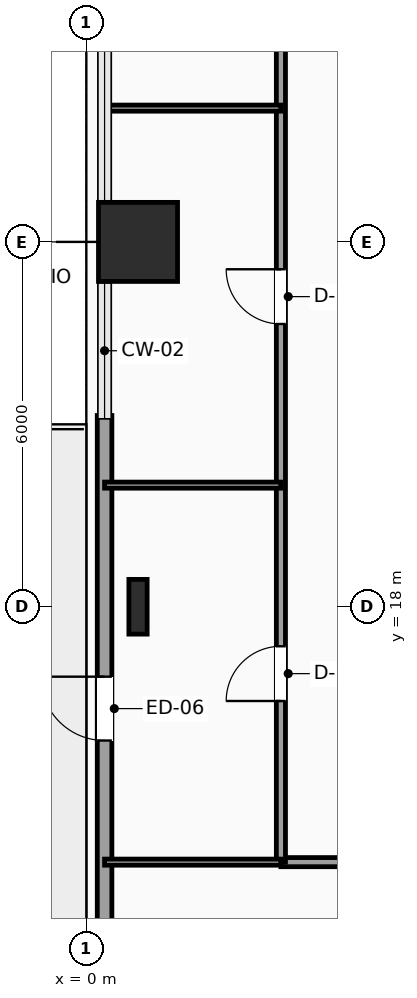
"""IFC4 building model, lengths in metres.
Left out: names, types, materials, properties, quantities, classifications, styles, units other than length and angle.
Written with IfcOpenShell. Run it as: python <this file> out.ifc"""

import sys

from ifc_helpers import new_model, si_unit, direction, frame, frame_2d, origin, origin_2d, place, context, subcontext, project, spatial, rectangle, i_section, extrude, element, fill, save


model = new_model("IFC4")
c1 = context("Model", 3, precision=1e-05, world=origin(), true_north=direction((0.0, 1.0)))
c2 = subcontext(c1, "Body", "Model", "MODEL_VIEW")
j1 = project(units=[si_unit("LENGTHUNIT", "METRE"), si_unit("PLANEANGLEUNIT", "RADIAN")], contexts=[c1])
p1 = place(None, origin())
s1 = spatial("IfcSite", under=j1, at=p1, CompositionType="ELEMENT")
p2 = place(p1, origin())
s2 = spatial("IfcBuilding", under=s1, at=p2, CompositionType="ELEMENT")
p3 = place(p2, frame((0.0, 0.0, 36.3)))
s3 = spatial("IfcBuildingStorey", under=s2, at=p3, CompositionType="ELEMENT", Elevation=36.3)
p4 = place(p3, frame((0.85, 18.0, 0.0), z_axis=(0.0, 0.0, 1.0), x_axis=(1.0, 0.0, 0.0)))
e1 = element("IfcColumn", 1, at=p4, inside=s3, PredefinedType="COLUMN", context=c2, shape_type="SweptSolid", body=[
    extrude(i_section(OverallWidth=0.3, OverallDepth=0.9, WebThickness=0.019, FlangeThickness=0.035, FilletRadius=0.03, at=origin_2d()), origin(), (0.0, 0.0, 1.0), 3.9),
])
p5 = place(p3, frame((0.85, 24.0, 0.0), z_axis=(0.0, 0.0, 1.0), x_axis=(1.0, 0.0, 0.0)))
e2 = element("IfcColumn", 2, at=p5, inside=s3, PredefinedType="COLUMN", context=c2, shape_type="SweptSolid", body=[
    extrude(rectangle(XDim=1.3, YDim=1.3, at=origin_2d()), origin(), (0.0, 0.0, 1.0), 3.9),
])
p6 = place(p3, frame((0.3, 11.855, 0.0), z_axis=(0.0, 0.0, 1.0), x_axis=(0.0, 1.0, 0.0)))
e3 = element("IfcWall", 3, at=p6, inside=s3, PredefinedType="SOLIDWALL", context=c2, shape_type="SweptSolid", body=[
    extrude(rectangle(XDim=9.29, YDim=0.24, at=frame_2d((4.645, 0.0))), origin(), (0.0, 0.0, 1.0), 3.65),
])
p7 = place(p6, frame((3.945, 0.0, 0.0)))
e4 = element("IfcOpeningElement", 4, at=p7, cuts=e3, PredefinedType="OPENING", context=c2, shape_type="SweptSolid", body=[
    extrude(rectangle(XDim=1.05, YDim=2.2, at=frame_2d((0.525, 1.1))), frame((0.0, 0.13, 0.0), z_axis=(0.0, -1.0, 0.0), x_axis=(1.0, 0.0, 0.0)), (0.0, 0.0, 1.0), 0.26),
])
p8 = place(p3, frame((5.15, 13.8, 0.0), z_axis=(0.0, 0.0, 1.0), x_axis=(-1.0, 0.0, 0.0)))
e5 = element("IfcWall", 5, at=p8, inside=s3, PredefinedType="PARTITIONING", context=c2, shape_type="SweptSolid", body=[
    extrude(rectangle(XDim=1.95, YDim=0.15, at=frame_2d((0.975, 0.0))), origin(), (0.0, 0.0, 1.0), 3.65),
])
p9 = place(p3, frame((3.2, 13.8, 0.0), z_axis=(0.0, 0.0, 1.0), x_axis=(0.0, 1.0, 0.0)))
e6 = element("IfcWall", 6, at=p9, inside=s3, PredefinedType="PARTITIONING", context=c2, shape_type="SweptSolid", body=[
    extrude(rectangle(XDim=16.45, YDim=0.15, at=frame_2d((8.225, 0.0))), origin(), (0.0, 0.0, 1.0), 3.65),
])
p10 = place(p9, frame((2.65, 0.0, 0.0)))
e7 = element("IfcOpeningElement", 7, at=p10, cuts=e6, PredefinedType="OPENING", context=c2, shape_type="SweptSolid", body=[
    extrude(rectangle(XDim=0.9, YDim=2.1, at=frame_2d((0.45, 1.05))), frame((0.0, 0.085, 0.0), z_axis=(0.0, -1.0, 0.0), x_axis=(1.0, 0.0, 0.0)), (0.0, 0.0, 1.0), 0.17),
])
p11 = place(p9, frame((8.85, 0.0, 0.0)))
e8 = element("IfcOpeningElement", 8, at=p11, cuts=e6, PredefinedType="OPENING", context=c2, shape_type="SweptSolid", body=[
    extrude(rectangle(XDim=0.9, YDim=2.1, at=frame_2d((0.45, 1.05))), frame((0.0, 0.085, 0.0), z_axis=(0.0, -1.0, 0.0), x_axis=(1.0, 0.0, 0.0)), (0.0, 0.0, 1.0), 0.17),
])
p12 = place(p9, frame((13.975, 0.0, 0.0)))
e9 = element("IfcOpeningElement", 9, at=p12, cuts=e6, PredefinedType="OPENING", context=c2, shape_type="SweptSolid", body=[
    extrude(rectangle(XDim=0.9, YDim=2.1, at=frame_2d((0.45, 1.05))), frame((0.0, 0.085, 0.0), z_axis=(0.0, -1.0, 0.0), x_axis=(1.0, 0.0, 0.0)), (0.0, 0.0, 1.0), 0.17),
])
for number, where, z_axis, x_axis in (
    (10, (0.3, 13.8, 0.0), (0.0, 0.0, 1.0), (1.0, 0.0, 0.0)),
    (11, (0.3, 20.0, 0.0), (0.0, 0.0, 1.0), (1.0, 0.0, 0.0)),
    (12, (0.3, 26.2, 0.0), (0.0, 0.0, 1.0), (1.0, 0.0, 0.0)),
):
    element("IfcWall", number, at=place(p3, frame(where, z_axis=z_axis, x_axis=x_axis)), inside=s3, PredefinedType="PARTITIONING", context=c2, shape_type="SweptSolid", body=[
        extrude(rectangle(XDim=2.9, YDim=0.1, at=frame_2d((1.45, 0.0))), origin(), (0.0, 0.0, 1.0), 3.65),
    ])
p13 = place(p7, origin())
e13 = element("IfcDoor", 13, at=p13, inside=s3, OperationType="SINGLE_SWING_RIGHT", PredefinedType="DOOR", context=c2, shape_type="SweptSolid", body=[
    extrude(rectangle(XDim=1.05, YDim=2.2, at=frame_2d((0.525, 1.1))), frame((0.0, 0.025, 0.0), z_axis=(0.0, -1.0, 0.0), x_axis=(1.0, 0.0, 0.0)), (0.0, 0.0, 1.0), 0.05),
])
fill(e4, e13)
p14 = place(p10, origin())
e14 = element("IfcDoor", 14, at=p14, inside=s3, OperationType="SINGLE_SWING_LEFT", PredefinedType="DOOR", context=c2, shape_type="SweptSolid", body=[
    extrude(rectangle(XDim=0.9, YDim=2.1, at=frame_2d((0.45, 1.05))), frame((0.0, 0.025, 0.0), z_axis=(0.0, -1.0, 0.0), x_axis=(1.0, 0.0, 0.0)), (0.0, 0.0, 1.0), 0.05),
])
fill(e7, e14)
p15 = place(p11, origin())
e15 = element("IfcDoor", 15, at=p15, inside=s3, OperationType="SINGLE_SWING_RIGHT", PredefinedType="DOOR", context=c2, shape_type="SweptSolid", body=[
    extrude(rectangle(XDim=0.9, YDim=2.1, at=frame_2d((0.45, 1.05))), frame((0.0, 0.025, 0.0), z_axis=(0.0, -1.0, 0.0), x_axis=(1.0, 0.0, 0.0)), (0.0, 0.0, 1.0), 0.05),
])
fill(e8, e15)
save(model, sys.argv[1])
